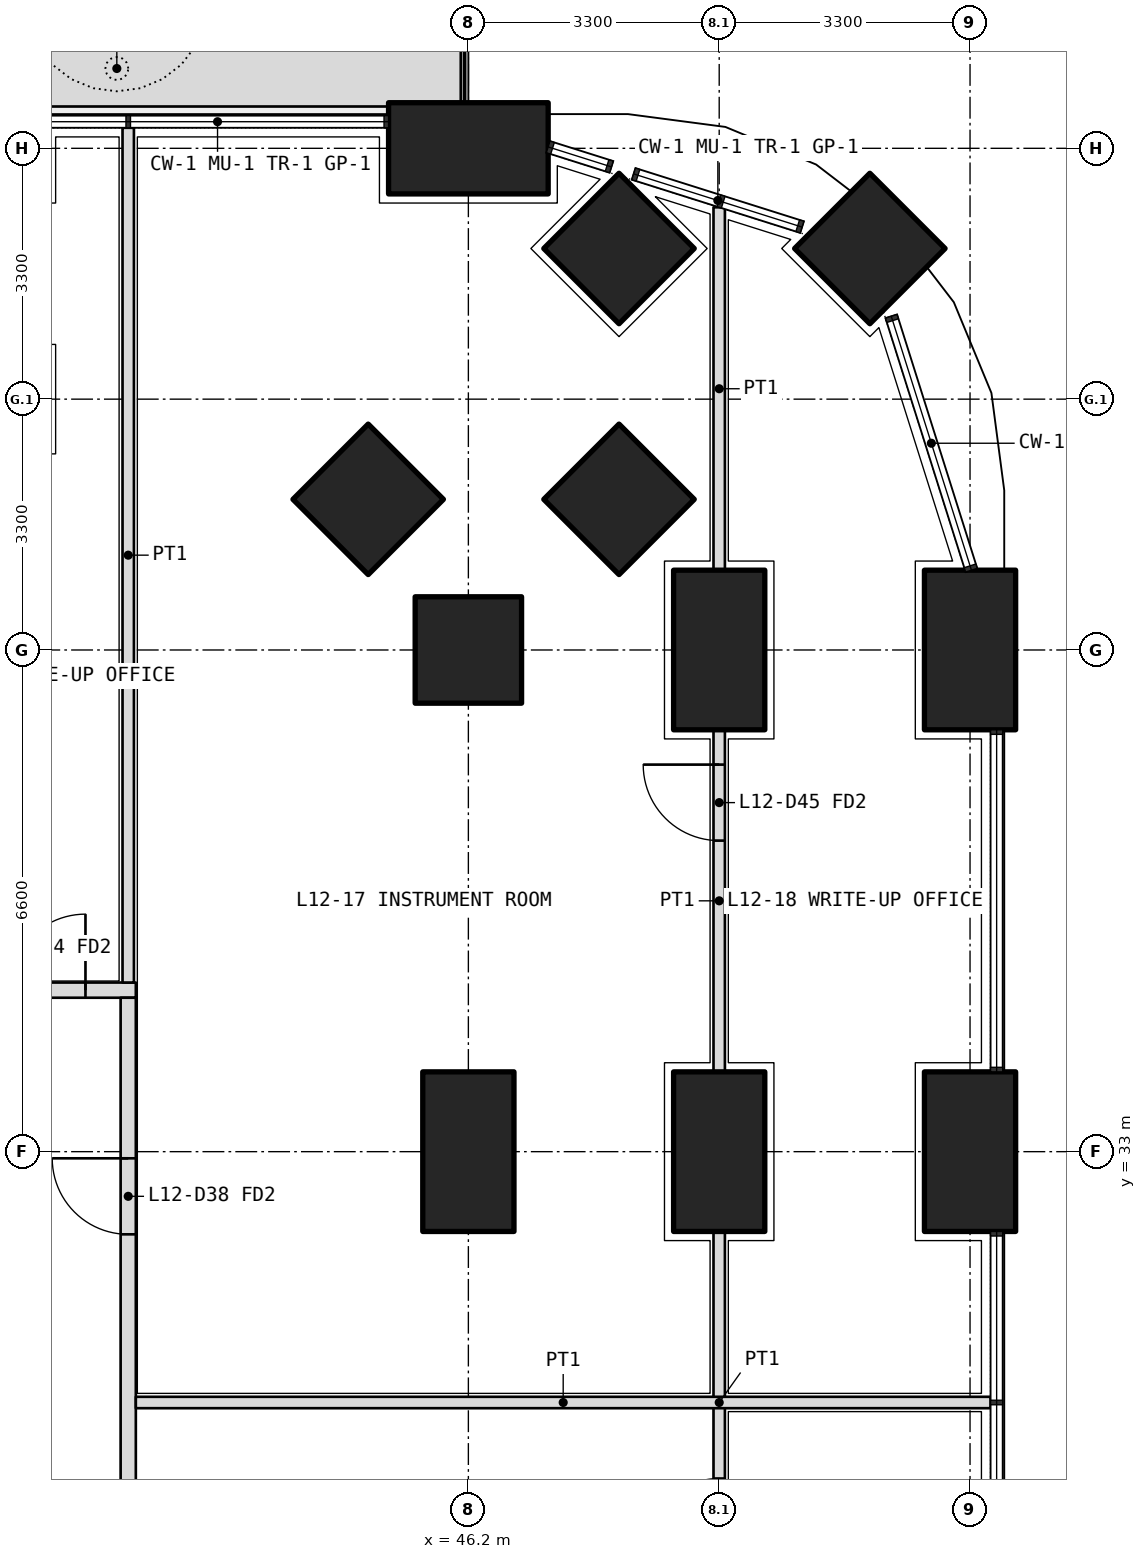
"""IFC4 building model, lengths in metres.
Left out: names, types, materials, properties, quantities, classifications, styles, units other than length and angle.
Written with IfcOpenShell. Run it as: python <this file> out.ifc"""

import sys

from ifc_helpers import new_model, si_unit, direction, frame, frame_2d, origin, origin_2d, place, context, subcontext, project, spatial, polyline, rectangle, outline, extrude, element, fill, save


model = new_model("IFC4")
c1 = context("Model", 3, precision=1e-05, world=origin(), true_north=direction((0.0, 1.0)))
c2 = subcontext(c1, "Body", "Model", "MODEL_VIEW")
j1 = project(units=[si_unit("LENGTHUNIT", "METRE"), si_unit("PLANEANGLEUNIT", "RADIAN")], contexts=[c1])
p1 = place(None, origin())
s1 = spatial("IfcSite", under=j1, at=p1, CompositionType="ELEMENT")
p2 = place(p1, origin())
s2 = spatial("IfcBuilding", under=s1, at=p2, CompositionType="ELEMENT")
p3 = place(p2, frame((0.0, 0.0, 54.9)))
s3 = spatial("IfcBuildingStorey", under=s2, at=p3, CompositionType="ELEMENT", Elevation=54.9)
p4 = place(p3, frame((51.482, 44.882, 0.0), z_axis=(0.0, 0.0, 1.0), x_axis=(0.707106781187, 0.707106781187, 0.0)))
e1 = element("IfcColumn", 1, at=p4, inside=s3, PredefinedType="COLUMN", context=c2, shape_type="SweptSolid", body=[
    extrude(rectangle(XDim=1.4, YDim=1.4, at=origin_2d()), origin(), (0.0, 0.0, 1.0), 4.2),
])
for number, where, z_axis, x_axis in (
    (2, (52.8, 33.0, 0.0), (0.0, 0.0, 1.0), (0.0, 1.0, 0.0)),
    (3, (52.8, 39.6, 0.0), (0.0, 0.0, 1.0), (0.0, 1.0, 0.0)),
    (4, (46.2, 46.2, 0.0), (0.0, 0.0, 1.0), (1.0, 0.0, 0.0)),
):
    element("IfcColumn", number, at=place(p3, frame(where, z_axis=z_axis, x_axis=x_axis)), inside=s3, PredefinedType="COLUMN", context=c2, shape_type="SweptSolid", body=[
        extrude(rectangle(XDim=2.1, YDim=1.2, at=origin_2d()), origin(), (0.0, 0.0, 1.0), 4.2),
    ])
for number, where, z_axis, x_axis in (
    (5, (46.2, 39.6, 0.0), (0.0, 0.0, 1.0), (1.0, 0.0, 0.0)),
    (6, (48.182, 44.882, 0.0), (0.0, 0.0, 1.0), (0.707, 0.707, 0.0)),
):
    element("IfcColumn", number, at=place(p3, frame(where, z_axis=z_axis, x_axis=x_axis)), inside=s3, PredefinedType="COLUMN", context=c2, shape_type="SweptSolid", body=[
        extrude(rectangle(XDim=1.4, YDim=1.4, at=origin_2d()), origin(), (0.0, 0.0, 1.0), 4.2),
    ])
for number, where, z_axis, x_axis in (
    (7, (49.5, 33.0, 0.0), (0.0, 0.0, 1.0), (0.0, 1.0, 0.0)),
    (8, (49.5, 39.6, 0.0), (0.0, 0.0, 1.0), (0.0, 1.0, 0.0)),
):
    element("IfcColumn", number, at=place(p3, frame(where, z_axis=z_axis, x_axis=x_axis)), inside=s3, PredefinedType="COLUMN", context=c2, shape_type="SweptSolid", body=[
        extrude(rectangle(XDim=2.1, YDim=1.2, at=origin_2d()), origin(), (0.0, 0.0, 1.0), 4.2),
    ])
for number, where, z_axis, x_axis in (
    (9, (48.182, 41.582, 0.0), (0.0, 0.0, 1.0), (0.707, 0.707, 0.0)),
    (10, (44.882, 41.582, 0.0), (0.0, 0.0, 1.0), (0.707, 0.707, 0.0)),
):
    element("IfcColumn", number, at=place(p3, frame(where, z_axis=z_axis, x_axis=x_axis)), inside=s3, PredefinedType="COLUMN", context=c2, shape_type="SweptSolid", body=[
        extrude(rectangle(XDim=1.4, YDim=1.4, at=origin_2d()), origin(), (0.0, 0.0, 1.0), 4.2),
    ])
p5 = place(p3, frame((46.2, 33.0, 0.0), z_axis=(0.0, 0.0, 1.0), x_axis=(0.0, 1.0, 0.0)))
e11 = element("IfcColumn", 11, at=p5, inside=s3, PredefinedType="COLUMN", context=c2, shape_type="SweptSolid", body=[
    extrude(rectangle(XDim=2.1, YDim=1.2, at=origin_2d()), origin(), (0.0, 0.0, 1.0), 4.2),
])
p6 = place(p3, origin())
e12 = element("IfcWall", 12, at=p6, inside=s3, PredefinedType="USERDEFINED", context=c2, shape_type="SweptSolid", body=[
    extrude(outline(polyline([(37.05, 46.75), (46.1, 46.75), (46.1, 47.75), (37.05, 47.75), (37.05, 46.75)]), holes=[polyline([(37.2, 46.9), (45.95, 46.9), (45.95, 47.6), (37.2, 47.6), (37.2, 46.9)])]), origin(), (0.0, 0.0, 1.0), 1.05),
])
p7 = place(p3, frame((10.975, 35.125, 0.0), z_axis=(0.0, 0.0, 1.0), x_axis=(1.0, 0.0, 0.0)))
e13 = element("IfcWall", 13, at=p7, inside=s3, PredefinedType="PARTITIONING", context=c2, shape_type="SweptSolid", body=[
    extrude(rectangle(XDim=30.85, YDim=0.2, at=frame_2d((15.425, 0.0))), origin(), (0.0, 0.0, 1.0), 2.85),
])
p8 = place(p7, frame((2.312, 0.0, 0.0)))
e14 = element("IfcOpeningElement", 14, at=p8, cuts=e13, PredefinedType="OPENING", context=c2, shape_type="SweptSolid", body=[
    extrude(rectangle(XDim=1.0, YDim=2.1, at=frame_2d((0.5, 1.05))), frame((0.0, 0.11, 0.0), z_axis=(0.0, -1.0, 0.0), x_axis=(1.0, 0.0, 0.0)), (0.0, 0.0, 1.0), 0.22),
])
p9 = place(p7, frame((11.625, 0.0, 0.0)))
e15 = element("IfcOpeningElement", 15, at=p9, cuts=e13, PredefinedType="OPENING", context=c2, shape_type="SweptSolid", body=[
    extrude(rectangle(XDim=1.0, YDim=2.1, at=frame_2d((0.5, 1.05))), frame((0.0, 0.11, 0.0), z_axis=(0.0, -1.0, 0.0), x_axis=(1.0, 0.0, 0.0)), (0.0, 0.0, 1.0), 0.22),
])
p10 = place(p7, frame((21.525, 0.0, 0.0)))
e16 = element("IfcOpeningElement", 16, at=p10, cuts=e13, PredefinedType="OPENING", context=c2, shape_type="SweptSolid", body=[
    extrude(rectangle(XDim=1.0, YDim=2.1, at=frame_2d((0.5, 1.05))), frame((0.0, 0.11, 0.0), z_axis=(0.0, -1.0, 0.0), x_axis=(1.0, 0.0, 0.0)), (0.0, 0.0, 1.0), 0.22),
])
p11 = place(p7, frame((26.475, 0.0, 0.0)))
e17 = element("IfcOpeningElement", 17, at=p11, cuts=e13, PredefinedType="OPENING", context=c2, shape_type="SweptSolid", body=[
    extrude(rectangle(XDim=1.0, YDim=2.1, at=frame_2d((0.5, 1.05))), frame((0.0, 0.11, 0.0), z_axis=(0.0, -1.0, 0.0), x_axis=(1.0, 0.0, 0.0)), (0.0, 0.0, 1.0), 0.22),
])
p12 = place(p7, frame((29.188, 0.0, 0.0)))
e18 = element("IfcOpeningElement", 18, at=p12, cuts=e13, PredefinedType="OPENING", context=c2, shape_type="SweptSolid", body=[
    extrude(rectangle(XDim=1.0, YDim=2.1, at=frame_2d((0.5, 1.05))), frame((0.0, 0.11, 0.0), z_axis=(0.0, -1.0, 0.0), x_axis=(1.0, 0.0, 0.0)), (0.0, 0.0, 1.0), 0.22),
])
p13 = place(p3, frame((41.725, 11.175, 0.0), z_axis=(0.0, 0.0, 1.0), x_axis=(0.0, 1.0, 0.0)))
e19 = element("IfcWall", 19, at=p13, inside=s3, PredefinedType="PARTITIONING", context=c2, shape_type="SweptSolid", body=[
    extrude(rectangle(XDim=23.85, YDim=0.2, at=frame_2d((11.925, 0.0))), origin(), (0.0, 0.0, 1.0), 2.85),
])
p14 = place(p13, frame((2.012, 0.0, 0.0)))
e20 = element("IfcOpeningElement", 20, at=p14, cuts=e19, PredefinedType="OPENING", context=c2, shape_type="SweptSolid", body=[
    extrude(rectangle(XDim=1.2, YDim=2.1, at=frame_2d((0.6, 1.05))), frame((0.0, 0.11, 0.0), z_axis=(0.0, -1.0, 0.0), x_axis=(1.0, 0.0, 0.0)), (0.0, 0.0, 1.0), 0.22),
])
p15 = place(p13, frame((6.475, 0.0, 0.0)))
e21 = element("IfcOpeningElement", 21, at=p15, cuts=e19, PredefinedType="OPENING", context=c2, shape_type="SweptSolid", body=[
    extrude(rectangle(XDim=1.0, YDim=2.1, at=frame_2d((0.5, 1.05))), frame((0.0, 0.11, 0.0), z_axis=(0.0, -1.0, 0.0), x_axis=(1.0, 0.0, 0.0)), (0.0, 0.0, 1.0), 0.22),
])
p16 = place(p13, frame((9.625, 0.0, 0.0)))
e22 = element("IfcOpeningElement", 22, at=p16, cuts=e19, PredefinedType="OPENING", context=c2, shape_type="SweptSolid", body=[
    extrude(rectangle(XDim=1.0, YDim=2.1, at=frame_2d((0.5, 1.05))), frame((0.0, 0.11, 0.0), z_axis=(0.0, -1.0, 0.0), x_axis=(1.0, 0.0, 0.0)), (0.0, 0.0, 1.0), 0.22),
])
p17 = place(p13, frame((12.975, 0.0, 0.0)))
e23 = element("IfcOpeningElement", 23, at=p17, cuts=e19, PredefinedType="OPENING", context=c2, shape_type="SweptSolid", body=[
    extrude(rectangle(XDim=0.9, YDim=2.1, at=frame_2d((0.45, 1.05))), frame((0.0, 0.11, 0.0), z_axis=(0.0, -1.0, 0.0), x_axis=(1.0, 0.0, 0.0)), (0.0, 0.0, 1.0), 0.22),
])
p18 = place(p13, frame((16.375, 0.0, 0.0)))
e24 = element("IfcOpeningElement", 24, at=p18, cuts=e19, PredefinedType="OPENING", context=c2, shape_type="SweptSolid", body=[
    extrude(rectangle(XDim=1.0, YDim=2.1, at=frame_2d((0.5, 1.05))), frame((0.0, 0.11, 0.0), z_axis=(0.0, -1.0, 0.0), x_axis=(1.0, 0.0, 0.0)), (0.0, 0.0, 1.0), 0.22),
])
p19 = place(p13, frame((20.738, 0.0, 0.0)))
e25 = element("IfcOpeningElement", 25, at=p19, cuts=e19, PredefinedType="OPENING", context=c2, shape_type="SweptSolid", body=[
    extrude(rectangle(XDim=1.0, YDim=2.1, at=frame_2d((0.5, 1.05))), frame((0.0, 0.11, 0.0), z_axis=(0.0, -1.0, 0.0), x_axis=(1.0, 0.0, 0.0)), (0.0, 0.0, 1.0), 0.22),
])
p20 = place(p3, frame((41.725, 46.47, 0.0), z_axis=(0.0, 0.0, 1.0), x_axis=(0.0, -1.0, 0.0)))
e26 = element("IfcWall", 26, at=p20, inside=s3, PredefinedType="PARTITIONING", context=c2, shape_type="SweptSolid", body=[
    extrude(rectangle(XDim=11.245, YDim=0.15, at=frame_2d((5.623, 0.0))), origin(), (0.0, 0.0, 1.0), 2.7),
])
p21 = place(p3, frame((49.5, 27.45, 0.0), z_axis=(0.0, 0.0, 1.0), x_axis=(0.0, 1.0, 0.0)))
e27 = element("IfcWall", 27, at=p21, inside=s3, PredefinedType="PARTITIONING", context=c2, shape_type="SweptSolid", body=[
    extrude(rectangle(XDim=4.5, YDim=0.15, at=frame_2d((2.25, 0.0))), origin(), (0.0, 0.0, 1.0), 3.9),
])
p22 = place(p21, frame((0.25, 0.0, 0.0)))
e28 = element("IfcOpeningElement", 28, at=p22, cuts=e27, PredefinedType="OPENING", context=c2, shape_type="SweptSolid", body=[
    extrude(rectangle(XDim=1.0, YDim=2.1, at=frame_2d((0.5, 1.05))), frame((0.0, 0.085, 0.0), z_axis=(0.0, -1.0, 0.0), x_axis=(1.0, 0.0, 0.0)), (0.0, 0.0, 1.0), 0.17),
])
p23 = place(p3, frame((49.5, 34.05, 0.0), z_axis=(0.0, 0.0, 1.0), x_axis=(0.0, 1.0, 0.0)))
e29 = element("IfcWall", 29, at=p23, inside=s3, PredefinedType="PARTITIONING", context=c2, shape_type="SweptSolid", body=[
    extrude(rectangle(XDim=4.5, YDim=0.15, at=frame_2d((2.25, 0.0))), origin(), (0.0, 0.0, 1.0), 3.9),
])
p24 = place(p23, frame((3.042, 0.0, 0.0)))
e30 = element("IfcOpeningElement", 30, at=p24, cuts=e29, PredefinedType="OPENING", context=c2, shape_type="SweptSolid", body=[
    extrude(rectangle(XDim=1.0, YDim=2.1, at=frame_2d((0.5, 1.05))), frame((0.0, 0.085, 0.0), z_axis=(0.0, -1.0, 0.0), x_axis=(1.0, 0.0, 0.0)), (0.0, 0.0, 1.0), 0.17),
])
p25 = place(p3, frame((49.5, 40.65, 0.0), z_axis=(0.0, 0.0, 1.0), x_axis=(0.0, 1.0, 0.0)))
e31 = element("IfcWall", 31, at=p25, inside=s3, PredefinedType="PARTITIONING", context=c2, shape_type="SweptSolid", body=[
    extrude(rectangle(XDim=4.774, YDim=0.15, at=frame_2d((2.387, 0.0))), origin(), (0.0, 0.0, 1.0), 2.7),
])
p26 = place(p3, frame((53.07, 29.7, 0.0), z_axis=(0.0, 0.0, 1.0), x_axis=(-1.0, 0.0, 0.0)))
e32 = element("IfcWall", 32, at=p26, inside=s3, PredefinedType="PARTITIONING", context=c2, shape_type="SweptSolid", body=[
    extrude(rectangle(XDim=11.245, YDim=0.15, at=frame_2d((5.623, 0.0))), origin(), (0.0, 0.0, 1.0), 2.7),
])
p27 = place(p19, origin())
e33 = element("IfcDoor", 33, at=p27, inside=s3, OperationType="SINGLE_SWING_RIGHT", PredefinedType="DOOR", context=c2, shape_type="SweptSolid", body=[
    extrude(rectangle(XDim=1.0, YDim=2.1, at=frame_2d((0.5, 1.05))), frame((0.0, 0.025, 0.0), z_axis=(0.0, -1.0, 0.0), x_axis=(1.0, 0.0, 0.0)), (0.0, 0.0, 1.0), 0.05),
])
fill(e25, e33)
p28 = place(p24, origin())
e34 = element("IfcDoor", 34, at=p28, inside=s3, OperationType="SINGLE_SWING_RIGHT", PredefinedType="DOOR", context=c2, shape_type="SweptSolid", body=[
    extrude(rectangle(XDim=1.0, YDim=2.1, at=frame_2d((0.5, 1.05))), frame((0.0, 0.025, 0.0), z_axis=(0.0, -1.0, 0.0), x_axis=(1.0, 0.0, 0.0)), (0.0, 0.0, 1.0), 0.05),
])
fill(e30, e34)
p29 = place(p12, origin())
e35 = element("IfcDoor", 35, at=p29, inside=s3, OperationType="SINGLE_SWING_RIGHT", PredefinedType="DOOR", context=c2, shape_type="SweptSolid", body=[
    extrude(rectangle(XDim=1.0, YDim=2.1, at=frame_2d((0.5, 1.05))), frame((0.0, 0.025, 0.0), z_axis=(0.0, -1.0, 0.0), x_axis=(1.0, 0.0, 0.0)), (0.0, 0.0, 1.0), 0.05),
])
fill(e18, e35)
save(model, sys.argv[1])
